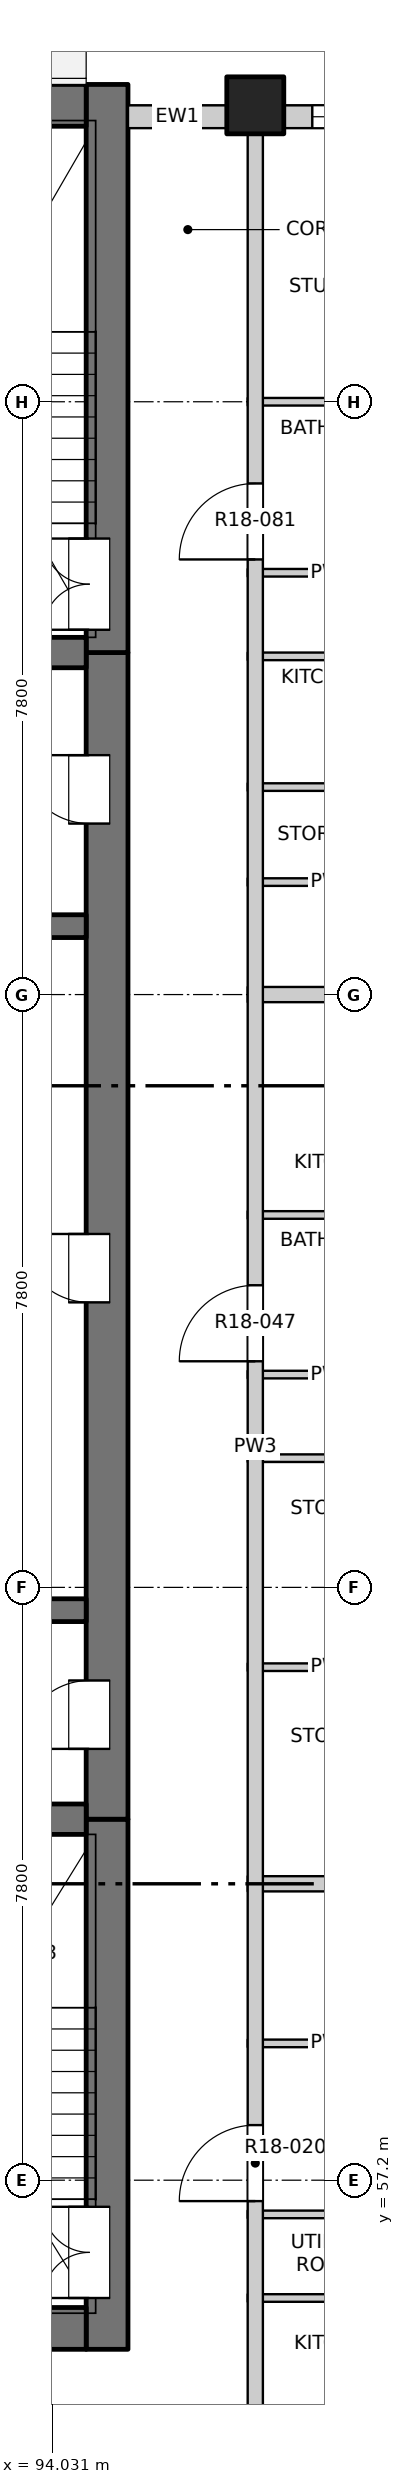
"""IFC4 building model, lengths in metres.
Left out: names, types, materials, properties, quantities, classifications, styles, units other than length and angle.
Written with IfcOpenShell. Run it as: python <this file> out.ifc"""

import sys

from ifc_helpers import new_model, si_unit, direction, frame, frame_2d, origin, origin_2d, place, context, subcontext, project, spatial, rectangle, extrude, element, fill, save


model = new_model("IFC4")
c1 = context("Model", 3, precision=1e-05, world=origin(), true_north=direction((0.0, 1.0)))
c2 = subcontext(c1, "Body", "Model", "MODEL_VIEW")
j1 = project(units=[si_unit("LENGTHUNIT", "METRE"), si_unit("PLANEANGLEUNIT", "RADIAN")], contexts=[c1])
p1 = place(None, origin())
s1 = spatial("IfcSite", under=j1, at=p1, CompositionType="ELEMENT")
p2 = place(p1, origin())
s2 = spatial("IfcBuilding", under=s1, at=p2, CompositionType="ELEMENT")
p3 = place(p2, frame((0.0, 0.0, 186.0)))
s3 = spatial("IfcBuildingStorey", under=s2, at=p3, CompositionType="ELEMENT", Elevation=186.0)
p4 = place(p3, frame((96.7, 84.5, -0.25), z_axis=(0.0, 0.0, 1.0), x_axis=(1.0, 0.0, 0.0)))
e1 = element("IfcColumn", 1, at=p4, inside=s3, PredefinedType="COLUMN", context=c2, shape_type="SweptSolid", body=[
    extrude(rectangle(XDim=0.75, YDim=0.75, at=origin_2d()), origin(), (0.0, 0.0, 1.0), 3.4),
])
p5 = place(p3, frame((94.75, 54.975, -0.25), z_axis=(0.0, 0.0, 1.0), x_axis=(0.0, 1.0, 0.0)))
e2 = element("IfcWall", 2, at=p5, inside=s3, PredefinedType="SOLIDWALL", context=c2, shape_type="SweptSolid", body=[
    extrude(rectangle(XDim=6.975, YDim=0.55, at=frame_2d((3.487, 0.0))), origin(), (0.0, 0.0, 1.0), 3.4),
])
p6 = place(p5, frame((0.675, 0.0, 0.25)))
e3 = element("IfcOpeningElement", 3, at=p6, cuts=e2, PredefinedType="OPENING", context=c2, shape_type="SweptSolid", body=[
    extrude(rectangle(XDim=1.2, YDim=2.1, at=frame_2d((0.6, 1.05))), frame((0.0, 0.285, 0.0), z_axis=(0.0, -1.0, 0.0), x_axis=(1.0, 0.0, 0.0)), (0.0, 0.0, 1.0), 0.57),
])
p7 = place(p3, frame((94.75, 61.95, -0.25), z_axis=(0.0, 0.0, 1.0), x_axis=(0.0, 1.0, 0.0)))
e4 = element("IfcWall", 4, at=p7, inside=s3, PredefinedType="SOLIDWALL", context=c2, shape_type="SweptSolid", body=[
    extrude(rectangle(XDim=15.35, YDim=0.55, at=frame_2d((7.675, 0.0))), origin(), (0.0, 0.0, 1.0), 3.4),
])
p8 = place(p7, frame((0.925, 0.0, 0.25)))
e5 = element("IfcOpeningElement", 5, at=p8, cuts=e4, PredefinedType="OPENING", context=c2, shape_type="SweptSolid", body=[
    extrude(rectangle(XDim=0.9, YDim=2.1, at=frame_2d((0.45, 1.05))), frame((0.0, 0.285, 0.0), z_axis=(0.0, -1.0, 0.0), x_axis=(1.0, 0.0, 0.0)), (0.0, 0.0, 1.0), 0.57),
])
p9 = place(p7, frame((6.8, 0.0, 0.25)))
e6 = element("IfcOpeningElement", 6, at=p9, cuts=e4, PredefinedType="OPENING", context=c2, shape_type="SweptSolid", body=[
    extrude(rectangle(XDim=0.9, YDim=2.1, at=frame_2d((0.45, 1.05))), frame((0.0, 0.285, 0.0), z_axis=(0.0, -1.0, 0.0), x_axis=(1.0, 0.0, 0.0)), (0.0, 0.0, 1.0), 0.57),
])
p10 = place(p7, frame((13.1, 0.0, 0.25)))
e7 = element("IfcOpeningElement", 7, at=p10, cuts=e4, PredefinedType="OPENING", context=c2, shape_type="SweptSolid", body=[
    extrude(rectangle(XDim=0.9, YDim=2.1, at=frame_2d((0.45, 1.05))), frame((0.0, 0.285, 0.0), z_axis=(0.0, -1.0, 0.0), x_axis=(1.0, 0.0, 0.0)), (0.0, 0.0, 1.0), 0.57),
])
p11 = place(p3, frame((94.75, 77.3, -0.25), z_axis=(0.0, 0.0, 1.0), x_axis=(0.0, 1.0, 0.0)))
e8 = element("IfcWall", 8, at=p11, inside=s3, PredefinedType="SOLIDWALL", context=c2, shape_type="SweptSolid", body=[
    extrude(rectangle(XDim=7.475, YDim=0.55, at=frame_2d((3.737, 0.0))), origin(), (0.0, 0.0, 1.0), 3.4),
])
p12 = place(p11, frame((0.3, 0.0, 0.25)))
e9 = element("IfcOpeningElement", 9, at=p12, cuts=e8, PredefinedType="OPENING", context=c2, shape_type="SweptSolid", body=[
    extrude(rectangle(XDim=1.2, YDim=2.1, at=frame_2d((0.6, 1.05))), frame((0.0, 0.285, 0.0), z_axis=(0.0, -1.0, 0.0), x_axis=(1.0, 0.0, 0.0)), (0.0, 0.0, 1.0), 0.57),
])
p13 = place(p3, frame((75.525, 55.25, -0.25), z_axis=(0.0, 0.0, 1.0), x_axis=(1.0, 0.0, 0.0)))
e10 = element("IfcWall", 10, at=p13, inside=s3, PredefinedType="SOLIDWALL", context=c2, shape_type="SweptSolid", body=[
    extrude(rectangle(XDim=18.95, YDim=0.55, at=frame_2d((9.475, 0.0))), origin(), (0.0, 0.0, 1.0), 3.4),
])
p14 = place(p13, frame((8.725, 0.0, 0.25)))
e11 = element("IfcOpeningElement", 11, at=p14, cuts=e10, PredefinedType="OPENING", context=c2, shape_type="SweptSolid", body=[
    extrude(rectangle(XDim=1.5, YDim=2.1, at=frame_2d((0.75, 1.05))), frame((0.0, 0.285, 0.0), z_axis=(0.0, -1.0, 0.0), x_axis=(1.0, 0.0, 0.0)), (0.0, 0.0, 1.0), 0.57),
])
p15 = place(p3, frame((75.525, 84.5, -0.25), z_axis=(0.0, 0.0, 1.0), x_axis=(1.0, 0.0, 0.0)))
e12 = element("IfcWall", 12, at=p15, inside=s3, PredefinedType="SOLIDWALL", context=c2, shape_type="SweptSolid", body=[
    extrude(rectangle(XDim=18.95, YDim=0.55, at=frame_2d((9.475, 0.0))), origin(), (0.0, 0.0, 1.0), 3.4),
])
p16 = place(p3, frame((90.7, 61.95, -0.25), z_axis=(0.0, 0.0, 1.0), x_axis=(1.0, 0.0, 0.0)))
e13 = element("IfcWall", 13, at=p16, inside=s3, PredefinedType="SOLIDWALL", context=c2, shape_type="SweptSolid", body=[
    extrude(rectangle(XDim=3.775, YDim=0.4, at=frame_2d((1.888, 0.0))), origin(), (0.0, 0.0, 1.0), 3.4),
])
for number, where, z_axis, x_axis in (
    (14, (90.7, 64.7, -0.25), (0.0, 0.0, 1.0), (1.0, 0.0, 0.0)),
    (15, (90.7, 73.7, -0.25), (0.0, 0.0, 1.0), (1.0, 0.0, 0.0)),
):
    element("IfcWall", number, at=place(p3, frame(where, z_axis=z_axis, x_axis=x_axis)), inside=s3, PredefinedType="SOLIDWALL", context=c2, shape_type="SweptSolid", body=[
        extrude(rectangle(XDim=3.775, YDim=0.3, at=frame_2d((1.888, 0.0))), origin(), (0.0, 0.0, 1.0), 3.4),
    ])
p17 = place(p3, frame((90.7, 77.3, -0.25), z_axis=(0.0, 0.0, 1.0), x_axis=(1.0, 0.0, 0.0)))
e16 = element("IfcWall", 16, at=p17, inside=s3, PredefinedType="SOLIDWALL", context=c2, shape_type="SweptSolid", body=[
    extrude(rectangle(XDim=3.775, YDim=0.4, at=frame_2d((1.888, 0.0))), origin(), (0.0, 0.0, 1.0), 3.4),
])
p18 = place(p3, frame((95.025, 84.35, 0.0), z_axis=(0.0, 0.0, 1.0), x_axis=(1.0, 0.0, 0.0)))
e17 = element("IfcWall", 17, at=p18, inside=s3, PredefinedType="SOLIDWALL", context=c2, shape_type="SweptSolid", body=[
    extrude(rectangle(XDim=1.3, YDim=0.3, at=frame_2d((0.65, 0.0))), origin(), (0.0, 0.0, 1.0), 2.7),
])
p19 = place(p3, frame((97.075, 84.35, 0.0), z_axis=(0.0, 0.0, 1.0), x_axis=(1.0, 0.0, 0.0)))
e18 = element("IfcWall", 18, at=p19, inside=s3, PredefinedType="SOLIDWALL", context=c2, shape_type="SweptSolid", body=[
    extrude(rectangle(XDim=3.525, YDim=0.3, at=frame_2d((1.763, 0.0))), origin(), (0.0, 0.0, 1.0), 2.7),
])
p20 = place(p19, frame((0.375, 0.0, 0.9)))
e19 = element("IfcOpeningElement", 19, at=p20, cuts=e18, PredefinedType="OPENING", context=c2, shape_type="SweptSolid", body=[
    extrude(rectangle(XDim=2.4, YDim=1.8, at=frame_2d((1.2, 0.9))), frame((0.0, 0.16, 0.0), z_axis=(0.0, -1.0, 0.0), x_axis=(1.0, 0.0, 0.0)), (0.0, 0.0, 1.0), 0.32),
])
for number, where, z_axis, x_axis in (
    (20, (96.6, 55.65, 0.0), (0.0, 0.0, 1.0), (1.0, 0.0, 0.0)),
    (21, (96.6, 56.75, 0.0), (0.0, 0.0, 1.0), (1.0, 0.0, 0.0)),
    (22, (96.6, 59.0, 0.0), (0.0, 0.0, 1.0), (1.0, 0.0, 0.0)),
):
    element("IfcWall", number, at=place(p3, frame(where, z_axis=z_axis, x_axis=x_axis)), inside=s3, PredefinedType="PARTITIONING", context=c2, shape_type="SweptSolid", body=[
        extrude(rectangle(XDim=2.22, YDim=0.1, at=frame_2d((1.11, 0.0))), origin(), (0.0, 0.0, 1.0), 3.15),
    ])
p21 = place(p3, frame((96.6, 61.1, 0.0), z_axis=(0.0, 0.0, 1.0), x_axis=(1.0, 0.0, 0.0)))
e23 = element("IfcWall", 23, at=p21, inside=s3, PredefinedType="PARTITIONING", context=c2, shape_type="SweptSolid", body=[
    extrude(rectangle(XDim=7.6, YDim=0.2, at=frame_2d((3.8, 0.0))), origin(), (0.0, 0.0, 1.0), 2.55),
])
for number, where, z_axis, x_axis in (
    (24, (96.6, 63.95, 0.0), (0.0, 0.0, 1.0), (1.0, 0.0, 0.0)),
    (25, (96.6, 66.7, 0.0), (0.0, 0.0, 1.0), (1.0, 0.0, 0.0)),
    (26, (96.6, 67.8, 0.0), (0.0, 0.0, 1.0), (1.0, 0.0, 0.0)),
    (27, (96.6, 69.9, 0.0), (0.0, 0.0, 1.0), (1.0, 0.0, 0.0)),
):
    element("IfcWall", number, at=place(p3, frame(where, z_axis=z_axis, x_axis=x_axis)), inside=s3, PredefinedType="PARTITIONING", context=c2, shape_type="SweptSolid", body=[
        extrude(rectangle(XDim=2.22, YDim=0.1, at=frame_2d((1.11, 0.0))), origin(), (0.0, 0.0, 1.0), 3.15),
    ])
p22 = place(p3, frame((96.6, 72.8, 0.0), z_axis=(0.0, 0.0, 1.0), x_axis=(1.0, 0.0, 0.0)))
e28 = element("IfcWall", 28, at=p22, inside=s3, PredefinedType="PARTITIONING", context=c2, shape_type="SweptSolid", body=[
    extrude(rectangle(XDim=7.6, YDim=0.2, at=frame_2d((3.8, 0.0))), origin(), (0.0, 0.0, 1.0), 3.15),
])
for number, where, z_axis, x_axis in (
    (29, (96.6, 74.28, 0.0), (0.0, 0.0, 1.0), (1.0, 0.0, 0.0)),
    (30, (96.6, 75.53, 0.0), (0.0, 0.0, 1.0), (1.0, 0.0, 0.0)),
    (31, (96.6, 77.25, 0.0), (0.0, 0.0, 1.0), (1.0, 0.0, 0.0)),
    (32, (96.6, 78.35, 0.0), (0.0, 0.0, 1.0), (1.0, 0.0, 0.0)),
):
    element("IfcWall", number, at=place(p3, frame(where, z_axis=z_axis, x_axis=x_axis)), inside=s3, PredefinedType="PARTITIONING", context=c2, shape_type="SweptSolid", body=[
        extrude(rectangle(XDim=2.22, YDim=0.1, at=frame_2d((1.11, 0.0))), origin(), (0.0, 0.0, 1.0), 3.15),
    ])
p23 = place(p3, frame((96.6, 80.6, 0.0), z_axis=(0.0, 0.0, 1.0), x_axis=(1.0, 0.0, 0.0)))
e33 = element("IfcWall", 33, at=p23, inside=s3, PredefinedType="PARTITIONING", context=c2, shape_type="SweptSolid", body=[
    extrude(rectangle(XDim=7.6, YDim=0.1, at=frame_2d((3.8, 0.0))), origin(), (0.0, 0.0, 1.0), 3.15),
])
p24 = place(p23, frame((2.56, 0.0, 0.0)))
e34 = element("IfcOpeningElement", 34, at=p24, cuts=e33, PredefinedType="OPENING", context=c2, shape_type="SweptSolid", body=[
    extrude(rectangle(XDim=0.9, YDim=2.1, at=frame_2d((0.45, 1.05))), frame((0.0, 0.06, 0.0), z_axis=(0.0, -1.0, 0.0), x_axis=(1.0, 0.0, 0.0)), (0.0, 0.0, 1.0), 0.12),
])
p25 = place(p3, frame((96.7, 49.5, 0.0), z_axis=(0.0, 0.0, 1.0), x_axis=(0.0, 1.0, 0.0)))
e35 = element("IfcWall", 35, at=p25, inside=s3, PredefinedType="PARTITIONING", context=c2, shape_type="SweptSolid", body=[
    extrude(rectangle(XDim=34.7, YDim=0.2, at=frame_2d((17.35, 0.0))), origin(), (0.0, 0.0, 1.0), 3.15),
])
p26 = place(p25, frame((7.425, 0.0, 0.0)))
e36 = element("IfcOpeningElement", 36, at=p26, cuts=e35, PredefinedType="OPENING", context=c2, shape_type="SweptSolid", body=[
    extrude(rectangle(XDim=1.0, YDim=2.1, at=frame_2d((0.5, 1.05))), frame((0.0, 0.11, 0.0), z_axis=(0.0, -1.0, 0.0), x_axis=(1.0, 0.0, 0.0)), (0.0, 0.0, 1.0), 0.22),
])
p27 = place(p25, frame((18.475, 0.0, 0.0)))
e37 = element("IfcOpeningElement", 37, at=p27, cuts=e35, PredefinedType="OPENING", context=c2, shape_type="SweptSolid", body=[
    extrude(rectangle(XDim=1.0, YDim=2.1, at=frame_2d((0.5, 1.05))), frame((0.0, 0.11, 0.0), z_axis=(0.0, -1.0, 0.0), x_axis=(1.0, 0.0, 0.0)), (0.0, 0.0, 1.0), 0.22),
])
p28 = place(p25, frame((29.025, 0.0, 0.0)))
e38 = element("IfcOpeningElement", 38, at=p28, cuts=e35, PredefinedType="OPENING", context=c2, shape_type="SweptSolid", body=[
    extrude(rectangle(XDim=1.0, YDim=2.1, at=frame_2d((0.5, 1.05))), frame((0.0, 0.11, 0.0), z_axis=(0.0, -1.0, 0.0), x_axis=(1.0, 0.0, 0.0)), (0.0, 0.0, 1.0), 0.22),
])
p29 = place(p20, origin())
e39 = element("IfcWindow", 39, at=p29, inside=s3, PartitioningType="DOUBLE_PANEL_VERTICAL", PredefinedType="WINDOW", context=c2, shape_type="SweptSolid", body=[
    extrude(rectangle(XDim=2.4, YDim=1.8, at=frame_2d((1.2, 0.9))), frame((0.0, 0.03, 0.0), z_axis=(0.0, -1.0, 0.0), x_axis=(1.0, 0.0, 0.0)), (0.0, 0.0, 1.0), 0.06),
])
fill(e19, e39)
p30 = place(p6, origin())
e40 = element("IfcDoor", 40, at=p30, inside=s3, OperationType="DOUBLE_DOOR_SINGLE_SWING", PredefinedType="DOOR", context=c2, shape_type="SweptSolid", body=[
    extrude(rectangle(XDim=1.2, YDim=2.1, at=frame_2d((0.6, 1.05))), frame((0.0, 0.26, 0.0), z_axis=(0.0, -1.0, 0.0), x_axis=(1.0, 0.0, 0.0)), (0.0, 0.0, 1.0), 0.05),
])
fill(e3, e40)
p31 = place(p26, origin())
e41 = element("IfcDoor", 41, at=p31, inside=s3, OperationType="SINGLE_SWING_LEFT", PredefinedType="DOOR", context=c2, shape_type="SweptSolid", body=[
    extrude(rectangle(XDim=1.0, YDim=2.1, at=frame_2d((0.5, 1.05))), frame((0.0, 0.025, 0.0), z_axis=(0.0, -1.0, 0.0), x_axis=(1.0, 0.0, 0.0)), (0.0, 0.0, 1.0), 0.05),
])
fill(e36, e41)
p32 = place(p8, origin())
e42 = element("IfcDoor", 42, at=p32, inside=s3, OperationType="SINGLE_SWING_LEFT", PredefinedType="DOOR", context=c2, shape_type="SweptSolid", body=[
    extrude(rectangle(XDim=0.9, YDim=2.1, at=frame_2d((0.45, 1.05))), frame((0.0, 0.26, 0.0), z_axis=(0.0, -1.0, 0.0), x_axis=(1.0, 0.0, 0.0)), (0.0, 0.0, 1.0), 0.05),
])
fill(e5, e42)
p33 = place(p27, origin())
e43 = element("IfcDoor", 43, at=p33, inside=s3, OperationType="SINGLE_SWING_LEFT", PredefinedType="DOOR", context=c2, shape_type="SweptSolid", body=[
    extrude(rectangle(XDim=1.0, YDim=2.1, at=frame_2d((0.5, 1.05))), frame((0.0, 0.025, 0.0), z_axis=(0.0, -1.0, 0.0), x_axis=(1.0, 0.0, 0.0)), (0.0, 0.0, 1.0), 0.05),
])
fill(e37, e43)
p34 = place(p9, origin())
e44 = element("IfcDoor", 44, at=p34, inside=s3, OperationType="SINGLE_SWING_RIGHT", PredefinedType="DOOR", context=c2, shape_type="SweptSolid", body=[
    extrude(rectangle(XDim=0.9, YDim=2.1, at=frame_2d((0.45, 1.05))), frame((0.0, 0.26, 0.0), z_axis=(0.0, -1.0, 0.0), x_axis=(1.0, 0.0, 0.0)), (0.0, 0.0, 1.0), 0.05),
])
fill(e6, e44)
p35 = place(p10, origin())
e45 = element("IfcDoor", 45, at=p35, inside=s3, OperationType="SINGLE_SWING_RIGHT", PredefinedType="DOOR", context=c2, shape_type="SweptSolid", body=[
    extrude(rectangle(XDim=0.9, YDim=2.1, at=frame_2d((0.45, 1.05))), frame((0.0, 0.26, 0.0), z_axis=(0.0, -1.0, 0.0), x_axis=(1.0, 0.0, 0.0)), (0.0, 0.0, 1.0), 0.05),
])
fill(e7, e45)
p36 = place(p12, origin())
e46 = element("IfcDoor", 46, at=p36, inside=s3, OperationType="DOUBLE_DOOR_SINGLE_SWING", PredefinedType="DOOR", context=c2, shape_type="SweptSolid", body=[
    extrude(rectangle(XDim=1.2, YDim=2.1, at=frame_2d((0.6, 1.05))), frame((0.0, 0.26, 0.0), z_axis=(0.0, -1.0, 0.0), x_axis=(1.0, 0.0, 0.0)), (0.0, 0.0, 1.0), 0.05),
])
fill(e9, e46)
p37 = place(p28, origin())
e47 = element("IfcDoor", 47, at=p37, inside=s3, OperationType="SINGLE_SWING_LEFT", PredefinedType="DOOR", context=c2, shape_type="SweptSolid", body=[
    extrude(rectangle(XDim=1.0, YDim=2.1, at=frame_2d((0.5, 1.05))), frame((0.0, 0.025, 0.0), z_axis=(0.0, -1.0, 0.0), x_axis=(1.0, 0.0, 0.0)), (0.0, 0.0, 1.0), 0.05),
])
fill(e38, e47)
save(model, sys.argv[1])
